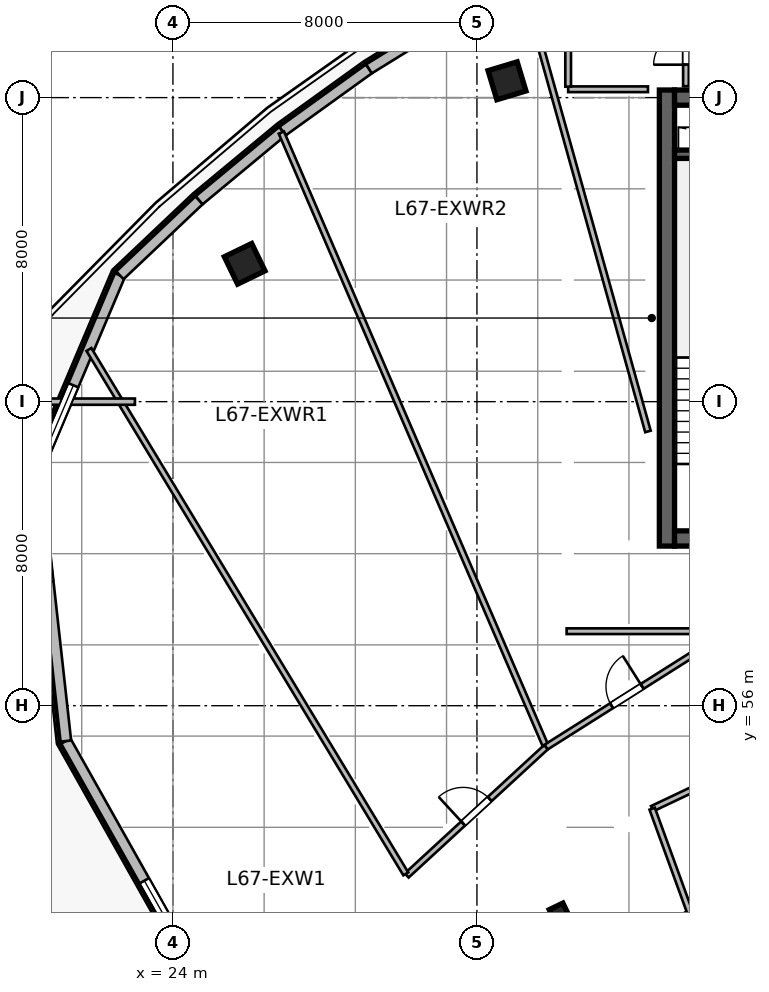
"""IFC4 building model, lengths in metres.
Left out: names, types, materials, properties, quantities, classifications, styles, units other than length and angle.
Written with IfcOpenShell. Run it as: python <this file> out.ifc"""

import sys

from ifc_helpers import new_model, si_unit, direction, frame, frame_2d, origin, origin_2d, place, context, subcontext, project, spatial, rectangle, i_section, extrude, source, transform, mapped, element, fill, save


model = new_model("IFC4")
c1 = context("Model", 3, precision=1e-05, world=origin(), true_north=direction((0.0, 1.0)))
c2 = subcontext(c1, "Body", "Model", "MODEL_VIEW")
j1 = project(units=[si_unit("LENGTHUNIT", "METRE"), si_unit("PLANEANGLEUNIT", "RADIAN")], contexts=[c1])
p1 = place(None, origin())
s1 = spatial("IfcSite", under=j1, at=p1, CompositionType="ELEMENT")
p2 = place(p1, origin())
s2 = spatial("IfcBuilding", under=s1, at=p2, CompositionType="ELEMENT")
p3 = place(p2, frame((0.0, 0.0, 275.7)))
s3 = spatial("IfcBuildingStorey", under=s2, at=p3, CompositionType="ELEMENT", Elevation=275.7)
m1 = source(origin(), c2, "Body", "SweptSolid", [
    extrude(rectangle(XDim=12.0, YDim=0.4, at=frame_2d((6.0, 0.0))), origin(), (0.0, 0.0, 1.0), 3.9),
])
p4 = place(p3, frame((37.0, 60.2, 0.0), z_axis=(0.0, 0.0, 1.0), x_axis=(0.0, 1.0, 0.0)))
e1 = element("IfcWall", 1, at=p4, inside=s3, PredefinedType="SHEAR", context=c2, shape_type="MappedRepresentation", body=[
    mapped(m1, transform((0.0, 0.0, 0.0), scale=1.0)),
])
m2 = source(origin(), c2, "Body", "SweptSolid", [
    extrude(rectangle(XDim=21.6, YDim=0.4, at=frame_2d((10.8, 0.0))), origin(), (0.0, 0.0, 1.0), 3.9),
])
p5 = place(p3, frame((37.2, 60.4, 0.0), z_axis=(0.0, 0.0, 1.0), x_axis=(1.0, 0.0, 0.0)))
e2 = element("IfcWall", 2, at=p5, inside=s3, PredefinedType="SHEAR", context=c2, shape_type="MappedRepresentation", body=[
    mapped(m2, transform((0.0, 0.0, 0.0), scale=1.0)),
])
p6 = place(p5, frame((1.1, 0.0, 0.0)))
e3 = element("IfcOpeningElement", 3, at=p6, cuts=e2, PredefinedType="OPENING", context=c2, shape_type="SweptSolid", body=[
    extrude(rectangle(XDim=1.15, YDim=2.15, at=frame_2d((0.575, 1.075))), frame((0.0, 0.21, 0.0), z_axis=(0.0, -1.0, 0.0), x_axis=(1.0, 0.0, 0.0)), (0.0, 0.0, 1.0), 0.42),
])
p7 = place(p5, frame((19.5, 0.0, 0.0)))
e4 = element("IfcOpeningElement", 4, at=p7, cuts=e2, PredefinedType="OPENING", context=c2, shape_type="SweptSolid", body=[
    extrude(rectangle(XDim=0.9, YDim=2.1, at=frame_2d((0.45, 1.05))), frame((0.0, 0.21, 0.0), z_axis=(0.0, -1.0, 0.0), x_axis=(1.0, 0.0, 0.0)), (0.0, 0.0, 1.0), 0.42),
])
p8 = place(p5, frame((12.02, 0.0, 0.0)))
e5 = element("IfcOpeningElement", 5, at=p8, cuts=e2, PredefinedType="OPENING", context=c2, shape_type="SweptSolid", body=[
    extrude(rectangle(XDim=1.6, YDim=2.15, at=frame_2d((0.8, 1.075))), frame((0.0, 0.21, 0.0), z_axis=(0.0, -1.0, 0.0), x_axis=(1.0, 0.0, 0.0)), (0.0, 0.0, 1.0), 0.42),
])
p9 = place(p3, frame((37.2, 72.0, 0.0), z_axis=(0.0, 0.0, 1.0), x_axis=(1.0, 0.0, 0.0)))
e6 = element("IfcWall", 6, at=p9, inside=s3, PredefinedType="SHEAR", context=c2, shape_type="MappedRepresentation", body=[
    mapped(m2, transform((0.0, 0.0, 0.0), scale=1.0)),
])
p10 = place(p9, frame((1.2, 0.0, 0.0)))
e7 = element("IfcOpeningElement", 7, at=p10, cuts=e6, PredefinedType="OPENING", context=c2, shape_type="SweptSolid", body=[
    extrude(rectangle(XDim=0.9, YDim=2.1, at=frame_2d((0.45, 1.05))), frame((0.0, 0.21, 0.0), z_axis=(0.0, -1.0, 0.0), x_axis=(1.0, 0.0, 0.0)), (0.0, 0.0, 1.0), 0.42),
])
p11 = place(p9, frame((14.7, 0.0, 0.0)))
e8 = element("IfcOpeningElement", 8, at=p11, cuts=e6, PredefinedType="OPENING", context=c2, shape_type="SweptSolid", body=[
    extrude(rectangle(XDim=1.2, YDim=2.15, at=frame_2d((0.6, 1.075))), frame((0.0, 0.21, 0.0), z_axis=(0.0, -1.0, 0.0), x_axis=(1.0, 0.0, 0.0)), (0.0, 0.0, 1.0), 0.42),
])
p12 = place(p9, frame((4.15, 0.0, 0.0)))
e9 = element("IfcOpeningElement", 9, at=p12, cuts=e6, PredefinedType="OPENING", context=c2, shape_type="SweptSolid", body=[
    extrude(rectangle(XDim=1.3, YDim=2.15, at=frame_2d((0.65, 1.075))), frame((0.0, 0.21, 0.0), z_axis=(0.0, -1.0, 0.0), x_axis=(1.0, 0.0, 0.0)), (0.0, 0.0, 1.0), 0.42),
])
p13 = place(p9, frame((6.76, 0.0, 0.0)))
e10 = element("IfcOpeningElement", 10, at=p13, cuts=e6, PredefinedType="OPENING", context=c2, shape_type="SweptSolid", body=[
    extrude(rectangle(XDim=0.85, YDim=2.1, at=frame_2d((0.425, 1.05))), frame((0.0, 0.21, 0.0), z_axis=(0.0, -1.0, 0.0), x_axis=(1.0, 0.0, 0.0)), (0.0, 0.0, 1.0), 0.42),
])
p14 = place(p9, frame((8.76, 0.0, 0.0)))
e11 = element("IfcOpeningElement", 11, at=p14, cuts=e6, PredefinedType="OPENING", context=c2, shape_type="SweptSolid", body=[
    extrude(rectangle(XDim=0.85, YDim=2.1, at=frame_2d((0.425, 1.05))), frame((0.0, 0.21, 0.0), z_axis=(0.0, -1.0, 0.0), x_axis=(1.0, 0.0, 0.0)), (0.0, 0.0, 1.0), 0.42),
])
p15 = place(p9, frame((10.725, 0.0, 0.0)))
e12 = element("IfcOpeningElement", 12, at=p15, cuts=e6, PredefinedType="OPENING", context=c2, shape_type="SweptSolid", body=[
    extrude(rectangle(XDim=0.85, YDim=2.1, at=frame_2d((0.425, 1.05))), frame((0.0, 0.21, 0.0), z_axis=(0.0, -1.0, 0.0), x_axis=(1.0, 0.0, 0.0)), (0.0, 0.0, 1.0), 0.42),
])
m3 = source(origin(), c2, "Body", "SweptSolid", [
    extrude(rectangle(XDim=3.27, YDim=0.22, at=frame_2d((1.635, 0.0))), origin(), (0.0, 0.0, 1.0), 3.9),
])
p16 = place(p3, frame((37.2, 70.51, 0.0), z_axis=(0.0, 0.0, 1.0), x_axis=(1.0, 0.0, 0.0)))
e13 = element("IfcWall", 13, at=p16, inside=s3, PredefinedType="SHEAR", context=c2, shape_type="MappedRepresentation", body=[
    mapped(m3, transform((0.0, 0.0, 0.0), scale=1.0)),
])
m4 = source(origin(), c2, "Body", "SweptSolid", [
    extrude(i_section(OverallWidth=0.399, OverallDepth=0.387, WebThickness=0.021, FlangeThickness=0.033, at=origin_2d()), origin(), (0.0, 0.0, 1.0), 3.9),
])
p17 = place(p3, frame((34.166, 50.545, 0.0), z_axis=(0.0, 0.0, 1.0), x_axis=(-0.436173672171, 0.899862504889, 0.0)))
e14 = element("IfcColumn", 14, at=p17, inside=s3, PredefinedType="COLUMN", context=c2, shape_type="MappedRepresentation", body=[
    mapped(m4, transform((0.0, 0.0, 0.0), scale=1.0)),
])
m5 = source(origin(), c2, "Body", "SweptSolid", [
    extrude(rectangle(XDim=0.8, YDim=0.8, at=origin_2d()), origin(), (0.0, 0.0, 1.0), 3.9),
])
for number, where, z_axis, x_axis in (
    (15, (25.888, 67.627, 0.0), (0.0, 0.0, 1.0), (-0.436, 0.9, 0.0)),
    (16, (32.791, 72.442, 0.0), (0.0, 0.0, 1.0), (-0.289, 0.957, 0.0)),
):
    element("IfcColumn", number, at=place(p3, frame(where, z_axis=z_axis, x_axis=x_axis)), inside=s3, PredefinedType="COLUMN", context=c2, shape_type="MappedRepresentation", body=[
        mapped(m5, transform((0.0, 0.0, 0.0), scale=1.0)),
    ])
m6 = source(origin(), c2, "Body", "SweptSolid", [
    extrude(rectangle(XDim=7.087, YDim=0.28, at=frame_2d((3.543, 0.0))), origin(), (0.0, 0.0, 1.0), 3.64),
])
p18 = place(p3, frame((24.656, 48.892, 0.0), z_axis=(0.0, 0.0, 1.0), x_axis=(-0.490158199368, 0.871633489256, 0.0)))
e17 = element("IfcWall", 17, at=p18, inside=s3, PredefinedType="SOLIDWALL", context=c2, shape_type="MappedRepresentation", body=[
    mapped(m6, transform((0.0, 0.0, 0.0), scale=1.0)),
])
p19 = place(p18, frame((0.672, 0.0, 0.95)))
e18 = element("IfcOpeningElement", 18, at=p19, cuts=e17, PredefinedType="OPENING", context=c2, shape_type="SweptSolid", body=[
    extrude(rectangle(XDim=2.2, YDim=2.1, at=frame_2d((1.1, 1.05))), frame((0.0, 0.15, 0.0), z_axis=(0.0, -1.0, 0.0), x_axis=(1.0, 0.0, 0.0)), (0.0, 0.0, 1.0), 0.3),
])
m7 = source(origin(), c2, "Body", "SweptSolid", [
    extrude(rectangle(XDim=7.09, YDim=0.28, at=frame_2d((3.545, 0.0))), origin(), (0.0, 0.0, 1.0), 3.64),
])
p20 = place(p3, frame((21.182, 55.069, 0.0), z_axis=(0.0, 0.0, 1.0), x_axis=(-0.110159396922, 0.993913933532, 0.0)))
e19 = element("IfcWall", 19, at=p20, inside=s3, PredefinedType="SOLIDWALL", context=c2, shape_type="MappedRepresentation", body=[
    mapped(m7, transform((0.0, 0.0, 0.0), scale=1.0)),
])
p21 = place(p20, frame((4.217, 0.0, 0.95)))
e20 = element("IfcOpeningElement", 20, at=p21, cuts=e19, PredefinedType="OPENING", context=c2, shape_type="SweptSolid", body=[
    extrude(rectangle(XDim=2.2, YDim=2.1, at=frame_2d((1.1, 1.05))), frame((0.0, 0.15, 0.0), z_axis=(0.0, -1.0, 0.0), x_axis=(1.0, 0.0, 0.0)), (0.0, 0.0, 1.0), 0.3),
])
m8 = source(origin(), c2, "Body", "SweptSolid", [
    extrude(rectangle(XDim=5.655, YDim=0.28, at=frame_2d((2.828, 0.0))), origin(), (0.0, 0.0, 1.0), 3.64),
])
p22 = place(p3, frame((20.401, 62.116, 0.0), z_axis=(0.0, 0.0, 1.0), x_axis=(0.389585063528, 0.920990487614, 0.0)))
e21 = element("IfcWall", 21, at=p22, inside=s3, PredefinedType="SOLIDWALL", context=c2, shape_type="MappedRepresentation", body=[
    mapped(m8, transform((0.0, 0.0, 0.0), scale=1.0)),
])
p23 = place(p22, frame((0.314, 0.0, 0.95)))
e22 = element("IfcOpeningElement", 22, at=p23, cuts=e21, PredefinedType="OPENING", context=c2, shape_type="SweptSolid", body=[
    extrude(rectangle(XDim=2.2, YDim=2.1, at=frame_2d((1.1, 1.05))), frame((0.0, 0.15, 0.0), z_axis=(0.0, -1.0, 0.0), x_axis=(1.0, 0.0, 0.0)), (0.0, 0.0, 1.0), 0.3),
])
m9 = source(origin(), c2, "Body", "SweptSolid", [
    extrude(rectangle(XDim=2.873, YDim=0.28, at=frame_2d((1.436, 0.0))), origin(), (0.0, 0.0, 1.0), 3.64),
])
p24 = place(p3, frame((22.604, 67.324, 0.0), z_axis=(0.0, 0.0, 1.0), x_axis=(0.72609560544, 0.687593754888, 0.0)))
e23 = element("IfcWall", 23, at=p24, inside=s3, PredefinedType="SOLIDWALL", context=c2, shape_type="MappedRepresentation", body=[
    mapped(m9, transform((0.0, 0.0, 0.0), scale=1.0)),
])
m10 = source(origin(), c2, "Body", "SweptSolid", [
    extrude(rectangle(XDim=2.852, YDim=0.28, at=frame_2d((1.426, 0.0))), origin(), (0.0, 0.0, 1.0), 3.64),
])
p25 = place(p3, frame((24.69, 69.299, 0.0), z_axis=(0.0, 0.0, 1.0), x_axis=(0.769783606009, 0.638304942735, 0.0)))
e24 = element("IfcWall", 24, at=p25, inside=s3, PredefinedType="SOLIDWALL", context=c2, shape_type="MappedRepresentation", body=[
    mapped(m10, transform((0.0, 0.0, 0.0), scale=1.0)),
])
m11 = source(origin(), c2, "Body", "SweptSolid", [
    extrude(rectangle(XDim=2.802, YDim=0.28, at=frame_2d((1.401, 0.0))), origin(), (0.0, 0.0, 1.0), 3.64),
])
p26 = place(p3, frame((26.885, 71.12, 0.0), z_axis=(0.0, 0.0, 1.0), x_axis=(0.811507896482, 0.584341453217, 0.0)))
e25 = element("IfcWall", 25, at=p26, inside=s3, PredefinedType="SOLIDWALL", context=c2, shape_type="MappedRepresentation", body=[
    mapped(m11, transform((0.0, 0.0, 0.0), scale=1.0)),
])
m12 = source(origin(), c2, "Body", "SweptSolid", [
    extrude(rectangle(XDim=2.755, YDim=0.28, at=frame_2d((1.377, 0.0))), origin(), (0.0, 0.0, 1.0), 3.64),
])
p27 = place(p3, frame((29.159, 72.757, 0.0), z_axis=(0.0, 0.0, 1.0), x_axis=(0.850750210743, 0.525570241661, 0.0)))
e26 = element("IfcWall", 26, at=p27, inside=s3, PredefinedType="SOLIDWALL", context=c2, shape_type="MappedRepresentation", body=[
    mapped(m12, transform((0.0, 0.0, 0.0), scale=1.0)),
])
m13 = source(origin(), c2, "Body", "SweptSolid", [
    extrude(rectangle(XDim=2.1, YDim=0.15, at=frame_2d((1.05, 0.0))), origin(), (0.0, 0.0, 1.0), 3.64),
])
p28 = place(p3, frame((34.4, 72.22, 0.0), z_axis=(0.0, 0.0, 1.0), x_axis=(1.0, 0.0, 0.0)))
e27 = element("IfcWall", 27, at=p28, inside=s3, PredefinedType="PARTITIONING", context=c2, shape_type="MappedRepresentation", body=[
    mapped(m13, transform((0.0, 0.0, 0.0), scale=1.0)),
])
m14 = source(origin(), c2, "Body", "SweptSolid", [
    extrude(rectangle(XDim=1.995, YDim=0.15, at=frame_2d((0.998, 0.0))), origin(), (0.0, 0.0, 1.0), 3.64),
])
p29 = place(p3, frame((34.4, 72.288, 0.0), z_axis=(0.0, 0.0, 1.0), x_axis=(0.0, 1.0, 0.0)))
e28 = element("IfcWall", 28, at=p29, inside=s3, PredefinedType="PARTITIONING", context=c2, shape_type="MappedRepresentation", body=[
    mapped(m14, transform((0.0, 0.0, 0.0), scale=1.0)),
])
m15 = source(origin(), c2, "Body", "SweptSolid", [
    extrude(rectangle(XDim=1.982, YDim=0.15, at=frame_2d((0.991, 0.0))), origin(), (0.0, 0.0, 1.0), 3.64),
])
p30 = place(p3, frame((37.5, 72.3, 0.0), z_axis=(0.0, 0.0, 1.0), x_axis=(0.0, 1.0, 0.0)))
e29 = element("IfcWall", 29, at=p30, inside=s3, PredefinedType="PARTITIONING", context=c2, shape_type="MappedRepresentation", body=[
    mapped(m15, transform((0.0, 0.0, 0.0), scale=1.0)),
])
p31 = place(p30, frame((0.566, 0.0, 0.0)))
e30 = element("IfcOpeningElement", 30, at=p31, cuts=e29, PredefinedType="OPENING", context=c2, shape_type="SweptSolid", body=[
    extrude(rectangle(XDim=0.85, YDim=2.1, at=frame_2d((0.425, 1.05))), frame((0.0, 0.085, 0.0), z_axis=(0.0, -1.0, 0.0), x_axis=(1.0, 0.0, 0.0)), (0.0, 0.0, 1.0), 0.17),
])
m16 = source(origin(), c2, "Body", "SweptSolid", [
    extrude(rectangle(XDim=6.137, YDim=0.15, at=frame_2d((3.069, 0.0))), origin(), (0.0, 0.0, 1.0), 3.64),
])
p32 = place(p3, frame((36.611, 53.29, 0.0), z_axis=(0.0, 0.0, 1.0), x_axis=(0.903442784804, 0.428708682657, 0.0)))
e31 = element("IfcWall", 31, at=p32, inside=s3, PredefinedType="PARTITIONING", context=c2, shape_type="MappedRepresentation", body=[
    mapped(m16, transform((0.0, 0.0, 0.0), scale=1.0)),
])
p33 = place(p32, frame((2.594, 0.0, 0.0)))
e32 = element("IfcOpeningElement", 32, at=p33, cuts=e31, PredefinedType="OPENING", context=c2, shape_type="SweptSolid", body=[
    extrude(rectangle(XDim=0.95, YDim=2.1, at=frame_2d((0.475, 1.05))), frame((0.0, 0.085, 0.0), z_axis=(0.0, -1.0, 0.0), x_axis=(1.0, 0.0, 0.0)), (0.0, 0.0, 1.0), 0.17),
])
m17 = source(origin(), c2, "Body", "SweptSolid", [
    extrude(rectangle(XDim=2.927, YDim=0.15, at=frame_2d((1.464, 0.0))), origin(), (0.0, 0.0, 1.0), 3.64),
])
p34 = place(p3, frame((37.612, 50.539, 0.0), z_axis=(0.0, 0.0, 1.0), x_axis=(-0.342030996507, 0.93968867048, 0.0)))
e33 = element("IfcWall", 33, at=p34, inside=s3, PredefinedType="PARTITIONING", context=c2, shape_type="MappedRepresentation", body=[
    mapped(m17, transform((0.0, 0.0, 0.0), scale=1.0)),
])
m18 = source(origin(), c2, "Body", "SweptSolid", [
    extrude(rectangle(XDim=4.986, YDim=0.15, at=frame_2d((2.493, 0.0))), origin(), (0.0, 0.0, 1.0), 3.64),
])
p35 = place(p3, frame((30.153, 51.533, 0.0), z_axis=(0.0, 0.0, 1.0), x_axis=(0.735595190169, 0.677421372707, 0.0)))
e34 = element("IfcWall", 34, at=p35, inside=s3, PredefinedType="PARTITIONING", context=c2, shape_type="MappedRepresentation", body=[
    mapped(m18, transform((0.0, 0.0, 0.0), scale=1.0)),
])
p36 = place(p35, frame((2.018, 0.0, 0.0)))
e35 = element("IfcOpeningElement", 35, at=p36, cuts=e34, PredefinedType="OPENING", context=c2, shape_type="SweptSolid", body=[
    extrude(rectangle(XDim=0.95, YDim=2.1, at=frame_2d((0.475, 1.05))), frame((0.0, 0.085, 0.0), z_axis=(0.0, -1.0, 0.0), x_axis=(1.0, 0.0, 0.0)), (0.0, 0.0, 1.0), 0.17),
])
m19 = source(origin(), c2, "Body", "SweptSolid", [
    extrude(rectangle(XDim=16.121, YDim=0.15, at=frame_2d((8.061, 0.0))), origin(), (0.0, 0.0, 1.0), 3.64),
])
p37 = place(p3, frame((30.127, 51.575, 0.0), z_axis=(0.0, 0.0, 1.0), x_axis=(-0.517212483904, 0.855857024563, 0.0)))
e36 = element("IfcWall", 36, at=p37, inside=s3, PredefinedType="PARTITIONING", context=c2, shape_type="MappedRepresentation", body=[
    mapped(m19, transform((0.0, 0.0, 0.0), scale=1.0)),
])
m20 = source(origin(), c2, "Body", "SweptSolid", [
    extrude(rectangle(XDim=17.556, YDim=0.15, at=frame_2d((8.778, 0.0))), origin(), (0.0, 0.0, 1.0), 3.64),
])
p38 = place(p3, frame((33.8, 54.958, 0.0), z_axis=(0.0, 0.0, 1.0), x_axis=(-0.395687598313, 0.918385172213, 0.0)))
e37 = element("IfcWall", 37, at=p38, inside=s3, PredefinedType="PARTITIONING", context=c2, shape_type="MappedRepresentation", body=[
    mapped(m20, transform((0.0, 0.0, 0.0), scale=1.0)),
])
m21 = source(origin(), c2, "Body", "SweptSolid", [
    extrude(rectangle(XDim=5.025, YDim=0.15, at=frame_2d((2.513, 0.0))), origin(), (0.0, 0.0, 1.0), 3.64),
])
p39 = place(p3, frame((33.82, 54.911, 0.0), z_axis=(0.0, 0.0, 1.0), x_axis=(0.84532378062, 0.534254345717, 0.0)))
e38 = element("IfcWall", 38, at=p39, inside=s3, PredefinedType="PARTITIONING", context=c2, shape_type="MappedRepresentation", body=[
    mapped(m21, transform((0.0, 0.0, 0.0), scale=1.0)),
])
p40 = place(p39, frame((2.038, 0.0, 0.0)))
e39 = element("IfcOpeningElement", 39, at=p40, cuts=e38, PredefinedType="OPENING", context=c2, shape_type="SweptSolid", body=[
    extrude(rectangle(XDim=0.95, YDim=2.1, at=frame_2d((0.475, 1.05))), frame((0.0, 0.085, 0.0), z_axis=(0.0, -1.0, 0.0), x_axis=(1.0, 0.0, 0.0)), (0.0, 0.0, 1.0), 0.17),
])
m22 = source(origin(), c2, "Body", "SweptSolid", [
    extrude(rectangle(XDim=12.311, YDim=0.15, at=frame_2d((6.155, 0.0))), origin(), (0.0, 0.0, 1.0), 3.64),
])
p41 = place(p3, frame((36.5, 63.216, 0.0), z_axis=(0.0, 0.0, 1.0), x_axis=(-0.268759602651, 0.963207286093, 0.0)))
e40 = element("IfcWall", 40, at=p41, inside=s3, PredefinedType="PARTITIONING", context=c2, shape_type="MappedRepresentation", body=[
    mapped(m22, transform((0.0, 0.0, 0.0), scale=1.0)),
])
m23 = source(origin(), c2, "Body", "SweptSolid", [
    extrude(rectangle(XDim=12.39, YDim=0.15, at=frame_2d((6.195, 0.0))), origin(), (0.0, 0.0, 1.0), 3.27),
])
p42 = place(p3, frame((34.36, 57.96, 0.0), z_axis=(0.0, 0.0, 1.0), x_axis=(1.0, 0.0, 0.0)))
e41 = element("IfcWall", 41, at=p42, inside=s3, PredefinedType="PARTITIONING", context=c2, shape_type="MappedRepresentation", body=[
    mapped(m23, transform((0.0, 0.0, 0.0), scale=1.0)),
])
m24 = source(origin(), c2, "Body", "SweptSolid", [
    extrude(rectangle(XDim=3.0, YDim=0.165, at=frame_2d((1.5, 0.0))), origin(), (0.0, 0.0, 1.0), 0.65),
])
p43 = place(p3, frame((20.0, 64.0, 0.0), z_axis=(0.0, 0.0, 1.0), x_axis=(1.0, 0.0, 0.0)))
e42 = element("IfcWall", 42, at=p43, inside=s3, PredefinedType="PARAPET", context=c2, shape_type="MappedRepresentation", body=[
    mapped(m24, transform((0.0, 0.0, 0.0), scale=1.0)),
])
m25 = source(origin(), c2, "Body", "SweptSolid", [
    extrude(rectangle(XDim=2.2, YDim=2.1, at=frame_2d((1.1, 1.05))), frame((0.0, 0.03, 0.0), z_axis=(0.0, -1.0, 0.0), x_axis=(1.0, 0.0, 0.0)), (0.0, 0.0, 1.0), 0.06),
])
p44 = place(p19, origin())
e43 = element("IfcWindow", 43, at=p44, inside=s3, PartitioningType="TRIPLE_PANEL_VERTICAL", PredefinedType="WINDOW", context=c2, shape_type="MappedRepresentation", body=[
    mapped(m25, transform((0.0, 0.0, 0.0), scale=1.0)),
])
fill(e18, e43)
p45 = place(p23, origin())
e44 = element("IfcWindow", 44, at=p45, inside=s3, PartitioningType="TRIPLE_PANEL_VERTICAL", PredefinedType="WINDOW", context=c2, shape_type="MappedRepresentation", body=[
    mapped(m25, transform((0.0, 0.0, 0.0), scale=1.0)),
])
fill(e22, e44)
m26 = source(origin(), c2, "Body", "SweptSolid", [
    extrude(rectangle(XDim=0.85, YDim=2.1, at=frame_2d((0.425, 1.05))), frame((0.0, 0.025, 0.0), z_axis=(0.0, -1.0, 0.0), x_axis=(1.0, 0.0, 0.0)), (0.0, 0.0, 1.0), 0.05),
])
p46 = place(p31, origin())
e45 = element("IfcDoor", 45, at=p46, inside=s3, OperationType="SINGLE_SWING_LEFT", PredefinedType="DOOR", context=c2, shape_type="MappedRepresentation", body=[
    mapped(m26, transform((0.0, 0.0, 0.0), scale=1.0)),
])
fill(e30, e45)
m27 = source(origin(), c2, "Body", "SweptSolid", [
    extrude(rectangle(XDim=0.95, YDim=2.1, at=frame_2d((0.475, 1.05))), frame((0.0, 0.025, 0.0), z_axis=(0.0, -1.0, 0.0), x_axis=(1.0, 0.0, 0.0)), (0.0, 0.0, 1.0), 0.05),
])
p47 = place(p36, origin())
e46 = element("IfcDoor", 46, at=p47, inside=s3, OperationType="SINGLE_SWING_LEFT", PredefinedType="DOOR", context=c2, shape_type="MappedRepresentation", body=[
    mapped(m27, transform((0.0, 0.0, 0.0), scale=1.0)),
])
fill(e35, e46)
p48 = place(p40, origin())
e47 = element("IfcDoor", 47, at=p48, inside=s3, OperationType="SINGLE_SWING_RIGHT", PredefinedType="DOOR", context=c2, shape_type="MappedRepresentation", body=[
    mapped(m27, transform((0.0, 0.0, 0.0), scale=1.0)),
])
fill(e39, e47)
save(model, sys.argv[1])
